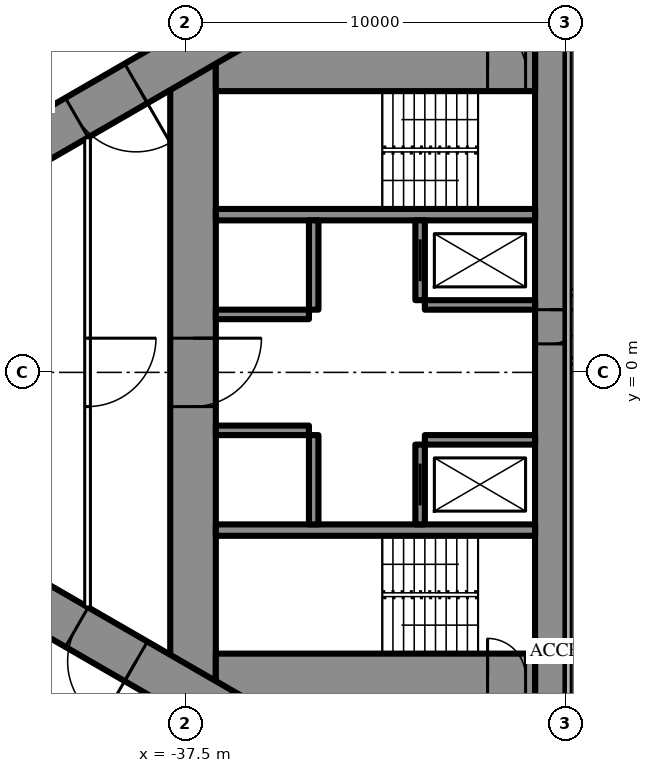
"""IFC4 building model, lengths in metres.
Left out: names, types, materials, properties, quantities, classifications, styles, units other than length and angle.
Written with IfcOpenShell. Run it as: python <this file> out.ifc"""

import sys

from ifc_helpers import new_model, si_unit, direction, frame, frame_2d, origin, place, context, subcontext, project, spatial, rectangle, extrude, element, fill, save


model = new_model("IFC4")
c1 = context("Model", 3, precision=1e-05, world=origin(), true_north=direction((0.0, 1.0)))
c2 = subcontext(c1, "Body", "Model", "MODEL_VIEW")
j1 = project(units=[si_unit("LENGTHUNIT", "METRE"), si_unit("PLANEANGLEUNIT", "RADIAN")], contexts=[c1])
p1 = place(None, origin())
s1 = spatial("IfcSite", under=j1, at=p1, CompositionType="ELEMENT")
p2 = place(p1, origin())
s2 = spatial("IfcBuilding", under=s1, at=p2, CompositionType="ELEMENT")
p3 = place(p2, frame((0.0, 0.0, 233.3)))
s3 = spatial("IfcBuildingStorey", under=s2, at=p3, CompositionType="ELEMENT", Elevation=233.3)
p4 = place(p3, frame((-27.9, 8.6, 0.0), z_axis=(0.0, 0.0, 1.0), x_axis=(0.0, -1.0, 0.0)))
e1 = element("IfcWall", 1, at=p4, inside=s3, PredefinedType="SHEAR", context=c2, shape_type="SweptSolid", body=[
    extrude(rectangle(XDim=17.2, YDim=0.8, at=frame_2d((8.6, 0.0))), origin(), (0.0, 0.0, 1.0), 3.6),
])
p5 = place(p4, frame((6.95, 0.0, 0.0)))
e2 = element("IfcOpeningElement", 2, at=p5, cuts=e1, PredefinedType="OPENING", context=c2, shape_type="SweptSolid", body=[
    extrude(rectangle(XDim=0.9, YDim=2.2, at=frame_2d((0.45, 1.1))), frame((0.0, 0.41, 0.0), z_axis=(0.0, -1.0, 0.0), x_axis=(1.0, 0.0, 0.0)), (0.0, 0.0, 1.0), 0.82),
])
p6 = place(p3, frame((-37.3, 8.6, 0.0), z_axis=(0.0, 0.0, 1.0), x_axis=(0.0, -1.0, 0.0)))
e3 = element("IfcWall", 3, at=p6, inside=s3, PredefinedType="SHEAR", context=c2, shape_type="SweptSolid", body=[
    extrude(rectangle(XDim=17.2, YDim=1.2, at=frame_2d((8.6, 0.0))), origin(), (0.0, 0.0, 1.0), 3.6),
])
p7 = place(p6, frame((7.7, 0.0, 0.0)))
e4 = element("IfcOpeningElement", 4, at=p7, cuts=e3, PredefinedType="OPENING", context=c2, shape_type="SweptSolid", body=[
    extrude(rectangle(XDim=1.8, YDim=2.2, at=frame_2d((0.9, 1.1))), frame((0.0, 0.61, 0.0), z_axis=(0.0, -1.0, 0.0), x_axis=(1.0, 0.0, 0.0)), (0.0, 0.0, 1.0), 1.22),
])
p8 = place(p3, frame((-28.3, 8.0, 0.0), z_axis=(0.0, 0.0, 1.0), x_axis=(-1.0, 0.0, 0.0)))
e5 = element("IfcWall", 5, at=p8, inside=s3, PredefinedType="SHEAR", context=c2, shape_type="SweptSolid", body=[
    extrude(rectangle(XDim=8.4, YDim=1.2, at=frame_2d((4.2, 0.0))), origin(), (0.0, 0.0, 1.0), 3.6),
])
p9 = place(p8, frame((0.25, 0.0, 0.0)))
e6 = element("IfcOpeningElement", 6, at=p9, cuts=e5, PredefinedType="OPENING", context=c2, shape_type="SweptSolid", body=[
    extrude(rectangle(XDim=1.0, YDim=2.2, at=frame_2d((0.5, 1.1))), frame((0.0, 0.61, 0.0), z_axis=(0.0, -1.0, 0.0), x_axis=(1.0, 0.0, 0.0)), (0.0, 0.0, 1.0), 1.22),
])
p10 = place(p3, frame((-28.3, -8.0, 0.0), z_axis=(0.0, 0.0, 1.0), x_axis=(-1.0, 0.0, 0.0)))
e7 = element("IfcWall", 7, at=p10, inside=s3, PredefinedType="SHEAR", context=c2, shape_type="SweptSolid", body=[
    extrude(rectangle(XDim=8.4, YDim=1.2, at=frame_2d((4.2, 0.0))), origin(), (0.0, 0.0, 1.0), 3.6),
])
p11 = place(p10, frame((0.25, 0.0, 0.0)))
e8 = element("IfcOpeningElement", 8, at=p11, cuts=e7, PredefinedType="OPENING", context=c2, shape_type="SweptSolid", body=[
    extrude(rectangle(XDim=1.0, YDim=2.2, at=frame_2d((0.5, 1.1))), frame((0.0, 0.61, 0.0), z_axis=(0.0, -1.0, 0.0), x_axis=(1.0, 0.0, 0.0)), (0.0, 0.0, 1.0), 1.22),
])
for number, where, z_axis, x_axis in (
    (9, (-28.3, 4.15, 0.0), (0.0, 0.0, 1.0), (-1.0, 0.0, 0.0)),
    (10, (-28.3, -4.15, 0.0), (0.0, 0.0, 1.0), (-1.0, 0.0, 0.0)),
):
    element("IfcWall", number, at=place(p3, frame(where, z_axis=z_axis, x_axis=x_axis)), inside=s3, PredefinedType="SHEAR", context=c2, shape_type="SweptSolid", body=[
        extrude(rectangle(XDim=8.4, YDim=0.3, at=frame_2d((4.2, 0.0))), origin(), (0.0, 0.0, 1.0), 3.6),
    ])
p12 = place(p3, frame((-31.325, 4.0, 0.0), z_axis=(0.0, 0.0, 1.0), x_axis=(0.0, -1.0, 0.0)))
e11 = element("IfcWall", 11, at=p12, inside=s3, PredefinedType="SHEAR", context=c2, shape_type="SweptSolid", body=[
    extrude(rectangle(XDim=2.1, YDim=0.25, at=frame_2d((1.05, 0.0))), origin(), (0.0, 0.0, 1.0), 3.6),
])
p13 = place(p12, frame((0.5, 0.0, 0.0)))
e12 = element("IfcOpeningElement", 12, at=p13, cuts=e11, PredefinedType="OPENING", context=c2, shape_type="SweptSolid", body=[
    extrude(rectangle(XDim=1.1, YDim=2.2, at=frame_2d((0.55, 1.1))), frame((0.0, 0.135, 0.0), z_axis=(0.0, -1.0, 0.0), x_axis=(1.0, 0.0, 0.0)), (0.0, 0.0, 1.0), 0.27),
])
p14 = place(p3, frame((-34.125, 4.0, 0.0), z_axis=(0.0, 0.0, 1.0), x_axis=(0.0, -1.0, 0.0)))
e13 = element("IfcWall", 13, at=p14, inside=s3, PredefinedType="SHEAR", context=c2, shape_type="SweptSolid", body=[
    extrude(rectangle(XDim=2.35, YDim=0.25, at=frame_2d((1.175, 0.0))), origin(), (0.0, 0.0, 1.0), 3.6),
])
p15 = place(p3, frame((-28.3, 1.775, 0.0), z_axis=(0.0, 0.0, 1.0), x_axis=(-1.0, 0.0, 0.0)))
e14 = element("IfcWall", 14, at=p15, inside=s3, PredefinedType="SHEAR", context=c2, shape_type="SweptSolid", body=[
    extrude(rectangle(XDim=2.9, YDim=0.25, at=frame_2d((1.45, 0.0))), origin(), (0.0, 0.0, 1.0), 3.6),
])
p16 = place(p3, frame((-34.25, 1.525, 0.0), z_axis=(0.0, 0.0, 1.0), x_axis=(-1.0, 0.0, 0.0)))
e15 = element("IfcWall", 15, at=p16, inside=s3, PredefinedType="SHEAR", context=c2, shape_type="SweptSolid", body=[
    extrude(rectangle(XDim=2.45, YDim=0.25, at=frame_2d((1.225, 0.0))), origin(), (0.0, 0.0, 1.0), 3.6),
])
p17 = place(p3, frame((-31.325, -1.9, 0.0), z_axis=(0.0, 0.0, 1.0), x_axis=(0.0, -1.0, 0.0)))
e16 = element("IfcWall", 16, at=p17, inside=s3, PredefinedType="SHEAR", context=c2, shape_type="SweptSolid", body=[
    extrude(rectangle(XDim=2.1, YDim=0.25, at=frame_2d((1.05, 0.0))), origin(), (0.0, 0.0, 1.0), 3.6),
])
p18 = place(p17, frame((0.5, 0.0, 0.0)))
e17 = element("IfcOpeningElement", 17, at=p18, cuts=e16, PredefinedType="OPENING", context=c2, shape_type="SweptSolid", body=[
    extrude(rectangle(XDim=1.1, YDim=2.2, at=frame_2d((0.55, 1.1))), frame((0.0, 0.135, 0.0), z_axis=(0.0, -1.0, 0.0), x_axis=(1.0, 0.0, 0.0)), (0.0, 0.0, 1.0), 0.27),
])
p19 = place(p3, frame((-34.125, -1.65, 0.0), z_axis=(0.0, 0.0, 1.0), x_axis=(0.0, -1.0, 0.0)))
e18 = element("IfcWall", 18, at=p19, inside=s3, PredefinedType="SHEAR", context=c2, shape_type="SweptSolid", body=[
    extrude(rectangle(XDim=2.35, YDim=0.25, at=frame_2d((1.175, 0.0))), origin(), (0.0, 0.0, 1.0), 3.6),
])
p20 = place(p3, frame((-28.3, -1.775, 0.0), z_axis=(0.0, 0.0, 1.0), x_axis=(-1.0, 0.0, 0.0)))
e19 = element("IfcWall", 19, at=p20, inside=s3, PredefinedType="SHEAR", context=c2, shape_type="SweptSolid", body=[
    extrude(rectangle(XDim=2.9, YDim=0.25, at=frame_2d((1.45, 0.0))), origin(), (0.0, 0.0, 1.0), 3.6),
])
p21 = place(p3, frame((-34.25, -1.525, 0.0), z_axis=(0.0, 0.0, 1.0), x_axis=(-1.0, 0.0, 0.0)))
e20 = element("IfcWall", 20, at=p21, inside=s3, PredefinedType="SHEAR", context=c2, shape_type="SweptSolid", body=[
    extrude(rectangle(XDim=2.45, YDim=0.25, at=frame_2d((1.225, 0.0))), origin(), (0.0, 0.0, 1.0), 3.6),
])
p22 = place(p3, frame((-27.2, 14.3, 0.0), z_axis=(0.0, 0.0, 1.0), x_axis=(-0.866026593062, -0.499997940104, 0.0)))
e21 = element("IfcWall", 21, at=p22, inside=s3, PredefinedType="SHEAR", context=c2, shape_type="SweptSolid", body=[
    extrude(rectangle(XDim=28.946, YDim=1.2, at=frame_2d((14.473, 0.0))), origin(), (0.0, 0.0, 1.0), 3.6),
])
p23 = place(p22, frame((4.6, 0.0, 0.0)))
e22 = element("IfcOpeningElement", 22, at=p23, cuts=e21, PredefinedType="OPENING", context=c2, shape_type="SweptSolid", body=[
    extrude(rectangle(XDim=1.0, YDim=2.2, at=frame_2d((0.5, 1.1))), frame((0.0, 0.61, 0.0), z_axis=(0.0, -1.0, 0.0), x_axis=(1.0, 0.0, 0.0)), (0.0, 0.0, 1.0), 1.22),
])
p24 = place(p22, frame((13.395, 0.0, 0.0)))
e23 = element("IfcOpeningElement", 23, at=p24, cuts=e21, PredefinedType="OPENING", context=c2, shape_type="SweptSolid", body=[
    extrude(rectangle(XDim=1.8, YDim=2.2, at=frame_2d((0.9, 1.1))), frame((0.0, 0.61, 0.0), z_axis=(0.0, -1.0, 0.0), x_axis=(1.0, 0.0, 0.0)), (0.0, 0.0, 1.0), 1.22),
])
p25 = place(p3, frame((-27.2, -14.3, 0.0), z_axis=(0.0, 0.0, 1.0), x_axis=(-0.866024021859, 0.500002393557, 0.0)))
e24 = element("IfcWall", 24, at=p25, inside=s3, PredefinedType="SHEAR", context=c2, shape_type="SweptSolid", body=[
    extrude(rectangle(XDim=27.907, YDim=1.2, at=frame_2d((13.954, 0.0))), origin(), (0.0, 0.0, 1.0), 3.6),
])
p26 = place(p25, frame((4.6, 0.0, 0.0)))
e25 = element("IfcOpeningElement", 25, at=p26, cuts=e24, PredefinedType="OPENING", context=c2, shape_type="SweptSolid", body=[
    extrude(rectangle(XDim=1.0, YDim=2.2, at=frame_2d((0.5, 1.1))), frame((0.0, 0.61, 0.0), z_axis=(0.0, -1.0, 0.0), x_axis=(1.0, 0.0, 0.0)), (0.0, 0.0, 1.0), 1.22),
])
p27 = place(p25, frame((13.395, 0.0, 0.0)))
e26 = element("IfcOpeningElement", 26, at=p27, cuts=e24, PredefinedType="OPENING", context=c2, shape_type="SweptSolid", body=[
    extrude(rectangle(XDim=1.8, YDim=2.2, at=frame_2d((0.9, 1.1))), frame((0.0, 0.61, 0.0), z_axis=(0.0, -1.0, 0.0), x_axis=(1.0, 0.0, 0.0)), (0.0, 0.0, 1.0), 1.22),
])
p28 = place(p3, frame((-28.737, 16.068, 0.0), z_axis=(0.0, 0.0, 1.0), x_axis=(-0.866023901326, -0.500002602325, 0.0)))
e27 = element("IfcWall", 27, at=p28, inside=s3, PredefinedType="PARTITIONING", context=c2, shape_type="SweptSolid", body=[
    extrude(rectangle(XDim=20.192, YDim=0.2, at=frame_2d((10.096, 0.0))), origin(), (0.0, 0.0, 1.0), 3.35),
])
p29 = place(p28, frame((1.08, 0.0, 0.0)))
e28 = element("IfcOpeningElement", 28, at=p29, cuts=e27, PredefinedType="OPENING", context=c2, shape_type="SweptSolid", body=[
    extrude(rectangle(XDim=1.8, YDim=2.03, at=frame_2d((0.9, 1.015))), frame((0.0, 0.11, 0.0), z_axis=(0.0, -1.0, 0.0), x_axis=(1.0, 0.0, 0.0)), (0.0, 0.0, 1.0), 0.22),
])
p30 = place(p28, frame((6.86, 0.0, 0.0)))
e29 = element("IfcOpeningElement", 29, at=p30, cuts=e27, PredefinedType="OPENING", context=c2, shape_type="SweptSolid", body=[
    extrude(rectangle(XDim=1.0, YDim=2.2, at=frame_2d((0.5, 1.1))), frame((0.0, 0.11, 0.0), z_axis=(0.0, -1.0, 0.0), x_axis=(1.0, 0.0, 0.0)), (0.0, 0.0, 1.0), 0.22),
])
p31 = place(p28, frame((18.867, 0.0, 0.0)))
e30 = element("IfcOpeningElement", 30, at=p31, cuts=e27, PredefinedType="OPENING", context=c2, shape_type="SweptSolid", body=[
    extrude(rectangle(XDim=0.95, YDim=2.2, at=frame_2d((0.475, 1.1))), frame((0.0, 0.11, 0.0), z_axis=(0.0, -1.0, 0.0), x_axis=(1.0, 0.0, 0.0)), (0.0, 0.0, 1.0), 0.22),
])
p32 = place(p3, frame((-40.075, 6.174, 0.0), z_axis=(0.0, 0.0, 1.0), x_axis=(0.0, -1.0, 0.0)))
e31 = element("IfcWall", 31, at=p32, inside=s3, PredefinedType="PARTITIONING", context=c2, shape_type="SweptSolid", body=[
    extrude(rectangle(XDim=12.348, YDim=0.15, at=frame_2d((6.174, 0.0))), origin(), (0.0, 0.0, 1.0), 3.35),
])
p33 = place(p32, frame((5.274, 0.0, 0.0)))
e32 = element("IfcOpeningElement", 32, at=p33, cuts=e31, PredefinedType="OPENING", context=c2, shape_type="SweptSolid", body=[
    extrude(rectangle(XDim=1.8, YDim=2.2, at=frame_2d((0.9, 1.1))), frame((0.0, 0.085, 0.0), z_axis=(0.0, -1.0, 0.0), x_axis=(1.0, 0.0, 0.0)), (0.0, 0.0, 1.0), 0.17),
])
p34 = place(p3, frame((-27.5, 0.3, 0.0), z_axis=(0.0, 0.0, 1.0), x_axis=(1.0, 0.0, 0.0)))
e33 = element("IfcWall", 33, at=p34, inside=s3, PredefinedType="PARTITIONING", context=c2, shape_type="SweptSolid", body=[
    extrude(rectangle(XDim=55.0, YDim=0.15, at=frame_2d((27.5, 0.0))), origin(), (0.0, 0.0, 1.0), 2.4),
])
p35 = place(p34, frame((1.575, 0.0, 0.0)))
e34 = element("IfcOpeningElement", 34, at=p35, cuts=e33, PredefinedType="OPENING", context=c2, shape_type="SweptSolid", body=[
    extrude(rectangle(XDim=1.0, YDim=2.2, at=frame_2d((0.5, 1.1))), frame((0.0, 0.085, 0.0), z_axis=(0.0, -1.0, 0.0), x_axis=(1.0, 0.0, 0.0)), (0.0, 0.0, 1.0), 0.17),
])
p36 = place(p34, frame((7.525, 0.0, 0.0)))
e35 = element("IfcOpeningElement", 35, at=p36, cuts=e33, PredefinedType="OPENING", context=c2, shape_type="SweptSolid", body=[
    extrude(rectangle(XDim=1.05, YDim=2.4, at=frame_2d((0.525, 1.2))), frame((0.0, 0.085, 0.0), z_axis=(0.0, -1.0, 0.0), x_axis=(1.0, 0.0, 0.0)), (0.0, 0.0, 1.0), 0.17),
])
p37 = place(p34, frame((18.525, 0.0, 0.0)))
e36 = element("IfcOpeningElement", 36, at=p37, cuts=e33, PredefinedType="OPENING", context=c2, shape_type="SweptSolid", body=[
    extrude(rectangle(XDim=1.05, YDim=2.4, at=frame_2d((0.525, 1.2))), frame((0.0, 0.085, 0.0), z_axis=(0.0, -1.0, 0.0), x_axis=(1.0, 0.0, 0.0)), (0.0, 0.0, 1.0), 0.17),
])
p38 = place(p34, frame((24.025, 0.0, 0.0)))
e37 = element("IfcOpeningElement", 37, at=p38, cuts=e33, PredefinedType="OPENING", context=c2, shape_type="SweptSolid", body=[
    extrude(rectangle(XDim=1.05, YDim=2.4, at=frame_2d((0.525, 1.2))), frame((0.0, 0.085, 0.0), z_axis=(0.0, -1.0, 0.0), x_axis=(1.0, 0.0, 0.0)), (0.0, 0.0, 1.0), 0.17),
])
p39 = place(p34, frame((35.025, 0.0, 0.0)))
e38 = element("IfcOpeningElement", 38, at=p39, cuts=e33, PredefinedType="OPENING", context=c2, shape_type="SweptSolid", body=[
    extrude(rectangle(XDim=1.05, YDim=2.4, at=frame_2d((0.525, 1.2))), frame((0.0, 0.085, 0.0), z_axis=(0.0, -1.0, 0.0), x_axis=(1.0, 0.0, 0.0)), (0.0, 0.0, 1.0), 0.17),
])
p40 = place(p34, frame((40.525, 0.0, 0.0)))
e39 = element("IfcOpeningElement", 39, at=p40, cuts=e33, PredefinedType="OPENING", context=c2, shape_type="SweptSolid", body=[
    extrude(rectangle(XDim=1.05, YDim=2.4, at=frame_2d((0.525, 1.2))), frame((0.0, 0.085, 0.0), z_axis=(0.0, -1.0, 0.0), x_axis=(1.0, 0.0, 0.0)), (0.0, 0.0, 1.0), 0.17),
])
p41 = place(p34, frame((52.525, 0.0, 0.0)))
e40 = element("IfcOpeningElement", 40, at=p41, cuts=e33, PredefinedType="OPENING", context=c2, shape_type="SweptSolid", body=[
    extrude(rectangle(XDim=1.05, YDim=2.4, at=frame_2d((0.525, 1.2))), frame((0.0, 0.085, 0.0), z_axis=(0.0, -1.0, 0.0), x_axis=(1.0, 0.0, 0.0)), (0.0, 0.0, 1.0), 0.17),
])
p42 = place(p3, frame((-27.5, 2.1, 0.0), z_axis=(0.0, 0.0, 1.0), x_axis=(1.0, 0.0, 0.0)))
e41 = element("IfcWall", 41, at=p42, inside=s3, PredefinedType="PARTITIONING", context=c2, shape_type="SweptSolid", body=[
    extrude(rectangle(XDim=22.35, YDim=0.15, at=frame_2d((11.175, 0.0))), origin(), (0.0, 0.0, 1.0), 3.4),
])
p43 = place(p42, frame((2.025, 0.0, 0.0)))
e42 = element("IfcOpeningElement", 42, at=p43, cuts=e41, PredefinedType="OPENING", context=c2, shape_type="SweptSolid", body=[
    extrude(rectangle(XDim=1.05, YDim=2.4, at=frame_2d((0.525, 1.2))), frame((0.0, 0.085, 0.0), z_axis=(0.0, -1.0, 0.0), x_axis=(1.0, 0.0, 0.0)), (0.0, 0.0, 1.0), 0.17),
])
p44 = place(p42, frame((7.525, 0.0, 0.0)))
e43 = element("IfcOpeningElement", 43, at=p44, cuts=e41, PredefinedType="OPENING", context=c2, shape_type="SweptSolid", body=[
    extrude(rectangle(XDim=1.05, YDim=2.4, at=frame_2d((0.525, 1.2))), frame((0.0, 0.085, 0.0), z_axis=(0.0, -1.0, 0.0), x_axis=(1.0, 0.0, 0.0)), (0.0, 0.0, 1.0), 0.17),
])
p45 = place(p42, frame((13.025, 0.0, 0.0)))
e44 = element("IfcOpeningElement", 44, at=p45, cuts=e41, PredefinedType="OPENING", context=c2, shape_type="SweptSolid", body=[
    extrude(rectangle(XDim=1.05, YDim=2.4, at=frame_2d((0.525, 1.2))), frame((0.0, 0.085, 0.0), z_axis=(0.0, -1.0, 0.0), x_axis=(1.0, 0.0, 0.0)), (0.0, 0.0, 1.0), 0.17),
])
p46 = place(p42, frame((18.525, 0.0, 0.0)))
e45 = element("IfcOpeningElement", 45, at=p46, cuts=e41, PredefinedType="OPENING", context=c2, shape_type="SweptSolid", body=[
    extrude(rectangle(XDim=1.05, YDim=2.4, at=frame_2d((0.525, 1.2))), frame((0.0, 0.085, 0.0), z_axis=(0.0, -1.0, 0.0), x_axis=(1.0, 0.0, 0.0)), (0.0, 0.0, 1.0), 0.17),
])
p47 = place(p3, frame((-39.758, -11.697, 0.0), z_axis=(0.0, 0.0, 1.0), x_axis=(-0.866024194504, 0.500002094529, 0.0)))
e46 = element("IfcWall", 46, at=p47, inside=s3, PredefinedType="PARTITIONING", context=c2, shape_type="SweptSolid", body=[
    extrude(rectangle(XDim=6.6, YDim=0.25, at=frame_2d((3.3, 0.0))), origin(), (0.0, 0.0, 1.0), 3.35),
])
p48 = place(p47, frame((0.75, 0.0, 0.0)))
e47 = element("IfcOpeningElement", 47, at=p48, cuts=e46, PredefinedType="OPENING", context=c2, shape_type="SweptSolid", body=[
    extrude(rectangle(XDim=1.1, YDim=2.2, at=frame_2d((0.55, 1.1))), frame((0.0, 0.135, 0.0), z_axis=(0.0, -1.0, 0.0), x_axis=(1.0, 0.0, 0.0)), (0.0, 0.0, 1.0), 0.27),
])
p49 = place(p47, frame((2.75, 0.0, 0.0)))
e48 = element("IfcOpeningElement", 48, at=p49, cuts=e46, PredefinedType="OPENING", context=c2, shape_type="SweptSolid", body=[
    extrude(rectangle(XDim=1.1, YDim=2.2, at=frame_2d((0.55, 1.1))), frame((0.0, 0.135, 0.0), z_axis=(0.0, -1.0, 0.0), x_axis=(1.0, 0.0, 0.0)), (0.0, 0.0, 1.0), 0.27),
])
p50 = place(p47, frame((4.75, 0.0, 0.0)))
e49 = element("IfcOpeningElement", 49, at=p50, cuts=e46, PredefinedType="OPENING", context=c2, shape_type="SweptSolid", body=[
    extrude(rectangle(XDim=1.1, YDim=2.2, at=frame_2d((0.55, 1.1))), frame((0.0, 0.135, 0.0), z_axis=(0.0, -1.0, 0.0), x_axis=(1.0, 0.0, 0.0)), (0.0, 0.0, 1.0), 0.27),
])
p51 = place(p33, origin())
e50 = element("IfcDoor", 50, at=p51, inside=s3, OperationType="DOUBLE_DOOR_SINGLE_SWING", PredefinedType="DOOR", context=c2, shape_type="SweptSolid", body=[
    extrude(rectangle(XDim=1.8, YDim=2.2, at=frame_2d((0.9, 1.1))), frame((0.0, 0.025, 0.0), z_axis=(0.0, -1.0, 0.0), x_axis=(1.0, 0.0, 0.0)), (0.0, 0.0, 1.0), 0.05),
])
fill(e32, e50)
p52 = place(p24, origin())
e51 = element("IfcDoor", 51, at=p52, inside=s3, OperationType="DOUBLE_DOOR_SINGLE_SWING", PredefinedType="DOOR", context=c2, shape_type="SweptSolid", body=[
    extrude(rectangle(XDim=1.8, YDim=2.2, at=frame_2d((0.9, 1.1))), frame((0.0, 0.025, 0.0), z_axis=(0.0, -1.0, 0.0), x_axis=(1.0, 0.0, 0.0)), (0.0, 0.0, 1.0), 0.05),
])
fill(e23, e51)
p53 = place(p27, origin())
e52 = element("IfcDoor", 52, at=p53, inside=s3, OperationType="DOUBLE_DOOR_SINGLE_SWING", PredefinedType="DOOR", context=c2, shape_type="SweptSolid", body=[
    extrude(rectangle(XDim=1.8, YDim=2.2, at=frame_2d((0.9, 1.1))), frame((0.0, 0.025, 0.0), z_axis=(0.0, -1.0, 0.0), x_axis=(1.0, 0.0, 0.0)), (0.0, 0.0, 1.0), 0.05),
])
fill(e26, e52)
p54 = place(p7, origin())
e53 = element("IfcDoor", 53, at=p54, inside=s3, OperationType="DOUBLE_DOOR_SINGLE_SWING", PredefinedType="DOOR", context=c2, shape_type="SweptSolid", body=[
    extrude(rectangle(XDim=1.8, YDim=2.2, at=frame_2d((0.9, 1.1))), frame((0.0, 0.025, 0.0), z_axis=(0.0, -1.0, 0.0), x_axis=(1.0, 0.0, 0.0)), (0.0, 0.0, 1.0), 0.05),
])
fill(e4, e53)
p55 = place(p9, origin())
e54 = element("IfcDoor", 54, at=p55, inside=s3, OperationType="SINGLE_SWING_RIGHT", PredefinedType="DOOR", context=c2, shape_type="SweptSolid", body=[
    extrude(rectangle(XDim=1.0, YDim=2.2, at=frame_2d((0.5, 1.1))), frame((0.0, 0.025, 0.0), z_axis=(0.0, -1.0, 0.0), x_axis=(1.0, 0.0, 0.0)), (0.0, 0.0, 1.0), 0.05),
])
fill(e6, e54)
p56 = place(p11, origin())
e55 = element("IfcDoor", 55, at=p56, inside=s3, OperationType="SINGLE_SWING_RIGHT", PredefinedType="DOOR", context=c2, shape_type="SweptSolid", body=[
    extrude(rectangle(XDim=1.0, YDim=2.2, at=frame_2d((0.5, 1.1))), frame((0.0, 0.025, 0.0), z_axis=(0.0, -1.0, 0.0), x_axis=(1.0, 0.0, 0.0)), (0.0, 0.0, 1.0), 0.05),
])
fill(e8, e55)
p57 = place(p5, origin())
e56 = element("IfcDoor", 56, at=p57, inside=s3, OperationType="SINGLE_SWING_LEFT", PredefinedType="DOOR", context=c2, shape_type="SweptSolid", body=[
    extrude(rectangle(XDim=0.9, YDim=2.2, at=frame_2d((0.45, 1.1))), frame((0.0, 0.025, 0.0), z_axis=(0.0, -1.0, 0.0), x_axis=(1.0, 0.0, 0.0)), (0.0, 0.0, 1.0), 0.05),
])
fill(e2, e56)
p58 = place(p13, origin())
e57 = element("IfcDoor", 57, at=p58, inside=s3, OperationType="SLIDING_TO_LEFT", PredefinedType="USERDEFINED", context=c2, shape_type="SweptSolid", body=[
    extrude(rectangle(XDim=1.1, YDim=2.2, at=frame_2d((0.55, 1.1))), frame((0.0, 0.025, 0.0), z_axis=(0.0, -1.0, 0.0), x_axis=(1.0, 0.0, 0.0)), (0.0, 0.0, 1.0), 0.05),
])
fill(e12, e57)
p59 = place(p18, origin())
e58 = element("IfcDoor", 58, at=p59, inside=s3, OperationType="SLIDING_TO_LEFT", PredefinedType="USERDEFINED", context=c2, shape_type="SweptSolid", body=[
    extrude(rectangle(XDim=1.1, YDim=2.2, at=frame_2d((0.55, 1.1))), frame((0.0, 0.025, 0.0), z_axis=(0.0, -1.0, 0.0), x_axis=(1.0, 0.0, 0.0)), (0.0, 0.0, 1.0), 0.05),
])
fill(e17, e58)
save(model, sys.argv[1])
